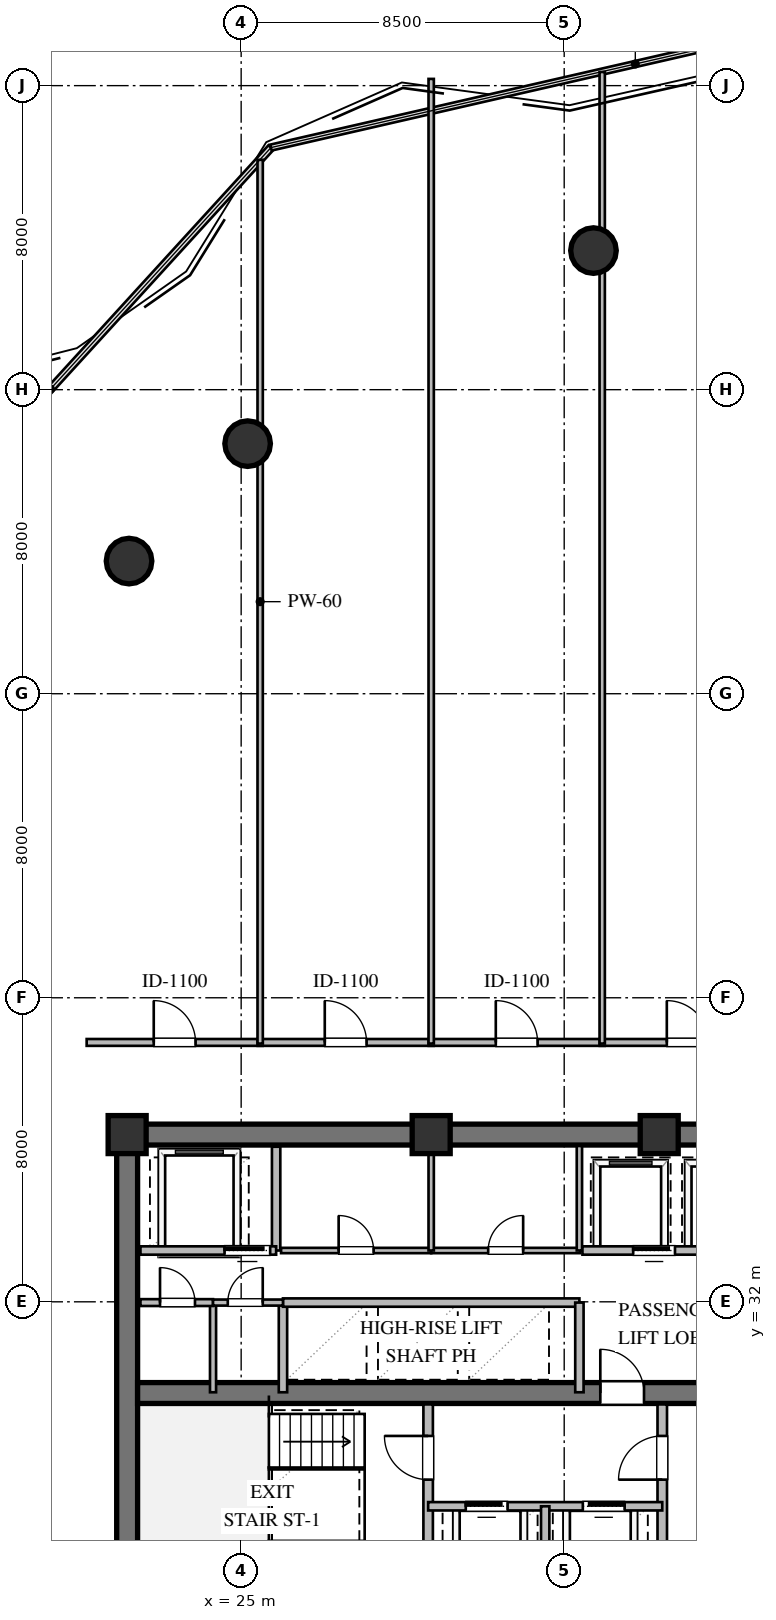
"""IFC4 building model, lengths in metres.
Left out: names, types, materials, properties, quantities, classifications, styles, units other than length and angle.
Written with IfcOpenShell. Run it as: python <this file> out.ifc"""

import sys

from ifc_helpers import new_model, si_unit, direction, frame, frame_2d, origin, origin_2d, place, context, subcontext, project, spatial, rectangle, circle, extrude, element, fill, save


model = new_model("IFC4")
c1 = context("Model", 3, precision=1e-05, world=origin(), true_north=direction((0.0, 1.0)))
c2 = subcontext(c1, "Body", "Model", "MODEL_VIEW")
j1 = project(units=[si_unit("LENGTHUNIT", "METRE"), si_unit("PLANEANGLEUNIT", "RADIAN")], contexts=[c1])
p1 = place(None, origin())
s1 = spatial("IfcSite", under=j1, at=p1, CompositionType="ELEMENT")
p2 = place(p1, origin())
s2 = spatial("IfcBuilding", under=s1, at=p2, CompositionType="ELEMENT")
p3 = place(p2, frame((0.0, 0.0, 171.0)))
s3 = spatial("IfcBuildingStorey", under=s2, at=p3, CompositionType="ELEMENT", Elevation=171.0)
p4 = place(p3, frame((21.725, 36.4, 0.0), z_axis=(0.0, 0.0, 1.0), x_axis=(1.0, 0.0, 0.0)))
e1 = element("IfcWall", 1, at=p4, inside=s3, PredefinedType="SHEAR", context=c2, shape_type="SweptSolid", body=[
    extrude(rectangle(XDim=22.55, YDim=0.55, at=frame_2d((11.275, 0.0))), origin(), (0.0, 0.0, 1.0), 3.36),
])
p5 = place(p3, frame((22.0, 23.875, 0.0), z_axis=(0.0, 0.0, 1.0), x_axis=(0.0, 1.0, 0.0)))
e2 = element("IfcWall", 2, at=p5, inside=s3, PredefinedType="SHEAR", context=c2, shape_type="SweptSolid", body=[
    extrude(rectangle(XDim=12.25, YDim=0.55, at=frame_2d((6.125, 0.0))), origin(), (0.0, 0.0, 1.0), 3.36),
])
p6 = place(p3, frame((22.275, 29.6, 0.0), z_axis=(0.0, 0.0, 1.0), x_axis=(1.0, 0.0, 0.0)))
e3 = element("IfcWall", 3, at=p6, inside=s3, PredefinedType="SHEAR", context=c2, shape_type="SweptSolid", body=[
    extrude(rectangle(XDim=21.45, YDim=0.55, at=frame_2d((10.725, 0.0))), origin(), (0.0, 0.0, 1.0), 3.36),
])
p7 = place(p6, frame((12.175, 0.0, 0.0)))
e4 = element("IfcOpeningElement", 4, at=p7, cuts=e3, PredefinedType="OPENING", context=c2, shape_type="SweptSolid", body=[
    extrude(rectangle(XDim=1.15, YDim=2.1, at=frame_2d((0.575, 1.05))), frame((0.0, 0.285, 0.0), z_axis=(0.0, -1.0, 0.0), x_axis=(1.0, 0.0, 0.0)), (0.0, 0.0, 1.0), 0.57),
])
for number, where, z_axis, x_axis in (
    (5, (36.0, 36.4, 0.0), (0.0, 0.0, 1.0), (1.0, 0.0, 0.0)),
    (6, (30.0, 36.4, 0.0), (0.0, 0.0, 1.0), (1.0, 0.0, 0.0)),
    (7, (22.0, 36.4, 0.0), (0.0, 0.0, 1.0), (1.0, 0.0, 0.0)),
):
    element("IfcColumn", number, at=place(p3, frame(where, z_axis=z_axis, x_axis=x_axis)), inside=s3, PredefinedType="COLUMN", context=c2, shape_type="SweptSolid", body=[
        extrude(rectangle(XDim=1.0, YDim=1.0, at=origin_2d()), origin(), (0.0, 0.0, 1.0), 3.6),
    ])
for number, where, z_axis, x_axis in (
    (8, (34.27, 59.66, 0.0), (0.0, 0.0, 1.0), (1.0, 0.0, 0.0)),
    (9, (25.17, 54.58, 0.0), (0.0, 0.0, 1.0), (1.0, 0.0, 0.0)),
    (10, (22.05, 51.49, 0.0), (0.0, 0.0, 1.0), (1.0, 0.0, 0.0)),
):
    element("IfcColumn", number, at=place(p3, frame(where, z_axis=z_axis, x_axis=x_axis)), inside=s3, PredefinedType="COLUMN", context=c2, shape_type="SweptSolid", body=[
        extrude(circle(Radius=0.6, at=origin_2d()), origin(), (0.0, 0.0, 1.0), 3.6),
    ])
p8 = place(p3, frame((29.92, 23.9, 0.0), z_axis=(0.0, 0.0, 1.0), x_axis=(0.0, 1.0, 0.0)))
e11 = element("IfcWall", 11, at=p8, inside=s3, PredefinedType="SOLIDWALL", context=c2, shape_type="SweptSolid", body=[
    extrude(rectangle(XDim=5.4, YDim=0.25, at=frame_2d((2.7, 0.0))), origin(), (0.0, 0.0, 1.0), 2.89),
])
p9 = place(p8, frame((3.421, 0.0, 0.0)))
e12 = element("IfcOpeningElement", 12, at=p9, cuts=e11, PredefinedType="OPENING", context=c2, shape_type="SweptSolid", body=[
    extrude(rectangle(XDim=1.15, YDim=2.1, at=frame_2d((0.575, 1.05))), frame((0.0, 0.135, 0.0), z_axis=(0.0, -1.0, 0.0), x_axis=(1.0, 0.0, 0.0)), (0.0, 0.0, 1.0), 0.27),
])
p10 = place(p3, frame((36.08, 23.9, 0.0), z_axis=(0.0, 0.0, 1.0), x_axis=(0.0, 1.0, 0.0)))
e13 = element("IfcWall", 13, at=p10, inside=s3, PredefinedType="SOLIDWALL", context=c2, shape_type="SweptSolid", body=[
    extrude(rectangle(XDim=5.4, YDim=0.25, at=frame_2d((2.7, 0.0))), origin(), (0.0, 0.0, 1.0), 3.36),
])
p11 = place(p10, frame((3.421, 0.0, 0.0)))
e14 = element("IfcOpeningElement", 14, at=p11, cuts=e13, PredefinedType="OPENING", context=c2, shape_type="SweptSolid", body=[
    extrude(rectangle(XDim=1.15, YDim=2.1, at=frame_2d((0.575, 1.05))), frame((0.0, 0.135, 0.0), z_axis=(0.0, -1.0, 0.0), x_axis=(1.0, 0.0, 0.0)), (0.0, 0.0, 1.0), 0.27),
])
p12 = place(p3, frame((29.92, 26.62, 0.0), z_axis=(0.0, 0.0, 1.0), x_axis=(1.0, 0.0, 0.0)))
e15 = element("IfcWall", 15, at=p12, inside=s3, PredefinedType="SOLIDWALL", context=c2, shape_type="SweptSolid", body=[
    extrude(rectangle(XDim=6.16, YDim=0.22, at=frame_2d((3.08, 0.0))), origin(), (0.0, 0.0, 1.0), 3.36),
])
p13 = place(p12, frame((0.99, 0.0, 0.0)))
e16 = element("IfcOpeningElement", 16, at=p13, cuts=e15, PredefinedType="OPENING", context=c2, shape_type="SweptSolid", body=[
    extrude(rectangle(XDim=1.1, YDim=2.1, at=frame_2d((0.55, 1.05))), frame((0.0, 0.12, 0.0), z_axis=(0.0, -1.0, 0.0), x_axis=(1.0, 0.0, 0.0)), (0.0, 0.0, 1.0), 0.24),
])
p14 = place(p12, frame((4.07, 0.0, 0.0)))
e17 = element("IfcOpeningElement", 17, at=p14, cuts=e15, PredefinedType="OPENING", context=c2, shape_type="SweptSolid", body=[
    extrude(rectangle(XDim=1.1, YDim=2.1, at=frame_2d((0.55, 1.05))), frame((0.0, 0.12, 0.0), z_axis=(0.0, -1.0, 0.0), x_axis=(1.0, 0.0, 0.0)), (0.0, 0.0, 1.0), 0.24),
])
p15 = place(p3, frame((33.0, 23.9, 0.0), z_axis=(0.0, 0.0, 1.0), x_axis=(0.0, 1.0, 0.0)))
e18 = element("IfcWall", 18, at=p15, inside=s3, PredefinedType="SOLIDWALL", context=c2, shape_type="SweptSolid", body=[
    extrude(rectangle(XDim=2.72, YDim=0.22, at=frame_2d((1.36, 0.0))), origin(), (0.0, 0.0, 1.0), 3.36),
])
p16 = place(p3, frame((25.92, 33.35, 0.0), z_axis=(0.0, 0.0, 1.0), x_axis=(0.0, 1.0, 0.0)))
e19 = element("IfcWall", 19, at=p16, inside=s3, PredefinedType="SOLIDWALL", context=c2, shape_type="SweptSolid", body=[
    extrude(rectangle(XDim=2.73, YDim=0.22, at=frame_2d((1.365, 0.0))), origin(), (0.0, 0.0, 1.0), 3.36),
])
p17 = place(p3, frame((22.35, 33.35, 0.0), z_axis=(0.0, 0.0, 1.0), x_axis=(1.0, 0.0, 0.0)))
e20 = element("IfcWall", 20, at=p17, inside=s3, PredefinedType="SOLIDWALL", context=c2, shape_type="SweptSolid", body=[
    extrude(rectangle(XDim=3.57, YDim=0.22, at=frame_2d((1.785, 0.0))), origin(), (0.0, 0.0, 1.0), 3.36),
])
p18 = place(p17, frame((2.213, 0.0, 0.0)))
e21 = element("IfcOpeningElement", 21, at=p18, cuts=e20, PredefinedType="OPENING", context=c2, shape_type="SweptSolid", body=[
    extrude(rectangle(XDim=1.2, YDim=2.1, at=frame_2d((0.6, 1.05))), frame((0.0, 0.12, 0.0), z_axis=(0.0, -1.0, 0.0), x_axis=(1.0, 0.0, 0.0)), (0.0, 0.0, 1.0), 0.24),
])
p19 = place(p3, frame((26.1, 29.62, 0.0), z_axis=(0.0, 0.0, 1.0), x_axis=(0.0, 1.0, 0.0)))
e22 = element("IfcWall", 22, at=p19, inside=s3, PredefinedType="SOLIDWALL", context=c2, shape_type="SweptSolid", body=[
    extrude(rectangle(XDim=2.36, YDim=0.22, at=frame_2d((1.18, 0.0))), origin(), (0.0, 0.0, 1.0), 3.36),
])
p20 = place(p3, frame((26.1, 31.98, 0.0), z_axis=(0.0, 0.0, 1.0), x_axis=(1.0, 0.0, 0.0)))
e23 = element("IfcWall", 23, at=p20, inside=s3, PredefinedType="SOLIDWALL", context=c2, shape_type="SweptSolid", body=[
    extrude(rectangle(XDim=7.8, YDim=0.22, at=frame_2d((3.9, 0.0))), origin(), (0.0, 0.0, 1.0), 3.36),
])
p21 = place(p3, frame((33.9, 29.62, 0.0), z_axis=(0.0, 0.0, 1.0), x_axis=(0.0, 1.0, 0.0)))
e24 = element("IfcWall", 24, at=p21, inside=s3, PredefinedType="SOLIDWALL", context=c2, shape_type="SweptSolid", body=[
    extrude(rectangle(XDim=2.36, YDim=0.22, at=frame_2d((1.18, 0.0))), origin(), (0.0, 0.0, 1.0), 3.36),
])
p22 = place(p3, frame((26.05, 33.35, 0.0), z_axis=(0.0, 0.0, 1.0), x_axis=(1.0, 0.0, 0.0)))
e25 = element("IfcWall", 25, at=p22, inside=s3, PredefinedType="PARTITIONING", context=c2, shape_type="SweptSolid", body=[
    extrude(rectangle(XDim=3.95, YDim=0.14, at=frame_2d((1.975, 0.0))), origin(), (0.0, 0.0, 1.0), 3.36),
])
p23 = place(p22, frame((1.515, 0.0, 0.0)))
e26 = element("IfcOpeningElement", 26, at=p23, cuts=e25, PredefinedType="OPENING", context=c2, shape_type="SweptSolid", body=[
    extrude(rectangle(XDim=0.92, YDim=2.1, at=frame_2d((0.46, 1.05))), frame((0.0, 0.08, 0.0), z_axis=(0.0, -1.0, 0.0), x_axis=(1.0, 0.0, 0.0)), (0.0, 0.0, 1.0), 0.16),
])
p24 = place(p3, frame((30.0, 33.35, 0.0), z_axis=(0.0, 0.0, 1.0), x_axis=(1.0, 0.0, 0.0)))
e27 = element("IfcWall", 27, at=p24, inside=s3, PredefinedType="PARTITIONING", context=c2, shape_type="SweptSolid", body=[
    extrude(rectangle(XDim=3.92, YDim=0.14, at=frame_2d((1.96, 0.0))), origin(), (0.0, 0.0, 1.0), 3.36),
])
p25 = place(p24, frame((1.5, 0.0, 0.0)))
e28 = element("IfcOpeningElement", 28, at=p25, cuts=e27, PredefinedType="OPENING", context=c2, shape_type="SweptSolid", body=[
    extrude(rectangle(XDim=0.92, YDim=2.1, at=frame_2d((0.46, 1.05))), frame((0.0, 0.08, 0.0), z_axis=(0.0, -1.0, 0.0), x_axis=(1.0, 0.0, 0.0)), (0.0, 0.0, 1.0), 0.16),
])
for number, where, z_axis, x_axis in (
    (29, (30.0, 33.35, 0.0), (0.0, 0.0, 1.0), (0.0, 1.0, 0.0)),
    (30, (33.9, 33.35, 0.0), (0.0, 0.0, 1.0), (0.0, 1.0, 0.0)),
):
    element("IfcWall", number, at=place(p3, frame(where, z_axis=z_axis, x_axis=x_axis)), inside=s3, PredefinedType="PARTITIONING", context=c2, shape_type="SweptSolid", body=[
        extrude(rectangle(XDim=2.75, YDim=0.14, at=frame_2d((1.375, 0.0))), origin(), (0.0, 0.0, 1.0), 3.36),
    ])
p26 = place(p3, frame((33.98, 33.35, 0.0), z_axis=(0.0, 0.0, 1.0), x_axis=(1.0, 0.0, 0.0)))
e31 = element("IfcWall", 31, at=p26, inside=s3, PredefinedType="SOLIDWALL", context=c2, shape_type="SweptSolid", body=[
    extrude(rectangle(XDim=7.54, YDim=0.22, at=frame_2d((3.77, 0.0))), origin(), (0.0, 0.0, 1.0), 3.36),
])
p27 = place(p26, frame((1.335, 0.0, 0.0)))
e32 = element("IfcOpeningElement", 32, at=p27, cuts=e31, PredefinedType="OPENING", context=c2, shape_type="SweptSolid", body=[
    extrude(rectangle(XDim=1.1, YDim=2.1, at=frame_2d((0.55, 1.05))), frame((0.0, 0.12, 0.0), z_axis=(0.0, -1.0, 0.0), x_axis=(1.0, 0.0, 0.0)), (0.0, 0.0, 1.0), 0.24),
])
p28 = place(p26, frame((4.879, 0.0, 0.0)))
e33 = element("IfcOpeningElement", 33, at=p28, cuts=e31, PredefinedType="OPENING", context=c2, shape_type="SweptSolid", body=[
    extrude(rectangle(XDim=1.1, YDim=2.1, at=frame_2d((0.55, 1.05))), frame((0.0, 0.12, 0.0), z_axis=(0.0, -1.0, 0.0), x_axis=(1.0, 0.0, 0.0)), (0.0, 0.0, 1.0), 0.24),
])
p29 = place(p3, frame((24.26, 29.62, 0.0), z_axis=(0.0, 0.0, 1.0), x_axis=(0.0, 1.0, 0.0)))
e34 = element("IfcWall", 34, at=p29, inside=s3, PredefinedType="PLUMBINGWALL", context=c2, shape_type="SweptSolid", body=[
    extrude(rectangle(XDim=2.36, YDim=0.16, at=frame_2d((1.18, 0.0))), origin(), (0.0, 0.0, 1.0), 3.36),
])
p30 = place(p3, frame((22.35, 31.98, 0.0), z_axis=(0.0, 0.0, 1.0), x_axis=(1.0, 0.0, 0.0)))
e35 = element("IfcWall", 35, at=p30, inside=s3, PredefinedType="PARTITIONING", context=c2, shape_type="SweptSolid", body=[
    extrude(rectangle(XDim=1.91, YDim=0.18, at=frame_2d((0.955, 0.0))), origin(), (0.0, 0.0, 1.0), 3.36),
])
p31 = place(p30, frame((0.515, 0.0, 0.0)))
e36 = element("IfcOpeningElement", 36, at=p31, cuts=e35, PredefinedType="OPENING", context=c2, shape_type="SweptSolid", body=[
    extrude(rectangle(XDim=0.92, YDim=2.1, at=frame_2d((0.46, 1.05))), frame((0.0, 0.1, 0.0), z_axis=(0.0, -1.0, 0.0), x_axis=(1.0, 0.0, 0.0)), (0.0, 0.0, 1.0), 0.2),
])
p32 = place(p3, frame((24.26, 31.98, 0.0), z_axis=(0.0, 0.0, 1.0), x_axis=(1.0, 0.0, 0.0)))
e37 = element("IfcWall", 37, at=p32, inside=s3, PredefinedType="PLUMBINGWALL", context=c2, shape_type="SweptSolid", body=[
    extrude(rectangle(XDim=1.84, YDim=0.16, at=frame_2d((0.92, 0.0))), origin(), (0.0, 0.0, 1.0), 3.36),
])
p33 = place(p32, frame((0.388, 0.0, 0.0)))
e38 = element("IfcOpeningElement", 38, at=p33, cuts=e37, PredefinedType="OPENING", context=c2, shape_type="SweptSolid", body=[
    extrude(rectangle(XDim=0.92, YDim=2.1, at=frame_2d((0.46, 1.05))), frame((0.0, 0.09, 0.0), z_axis=(0.0, -1.0, 0.0), x_axis=(1.0, 0.0, 0.0)), (0.0, 0.0, 1.0), 0.18),
])
p34 = place(p3, frame((20.935, 38.825, 0.0), z_axis=(0.0, 0.0, 1.0), x_axis=(1.0, 0.0, 0.0)))
e39 = element("IfcWall", 39, at=p34, inside=s3, PredefinedType="PARTITIONING", context=c2, shape_type="SweptSolid", body=[
    extrude(rectangle(XDim=4.63, YDim=0.18, at=frame_2d((2.315, 0.0))), origin(), (0.0, 0.0, 1.0), 3.36),
])
p35 = place(p34, frame((1.765, 0.0, 0.0)))
e40 = element("IfcOpeningElement", 40, at=p35, cuts=e39, PredefinedType="OPENING", context=c2, shape_type="SweptSolid", body=[
    extrude(rectangle(XDim=1.1, YDim=2.1, at=frame_2d((0.55, 1.05))), frame((0.0, 0.1, 0.0), z_axis=(0.0, -1.0, 0.0), x_axis=(1.0, 0.0, 0.0)), (0.0, 0.0, 1.0), 0.2),
])
p36 = place(p3, frame((25.435, 38.825, 0.0), z_axis=(0.0, 0.0, 1.0), x_axis=(1.0, 0.0, 0.0)))
e41 = element("IfcWall", 41, at=p36, inside=s3, PredefinedType="PARTITIONING", context=c2, shape_type="SweptSolid", body=[
    extrude(rectangle(XDim=4.63, YDim=0.18, at=frame_2d((2.315, 0.0))), origin(), (0.0, 0.0, 1.0), 3.36),
])
p37 = place(p36, frame((1.765, 0.0, 0.0)))
e42 = element("IfcOpeningElement", 42, at=p37, cuts=e41, PredefinedType="OPENING", context=c2, shape_type="SweptSolid", body=[
    extrude(rectangle(XDim=1.1, YDim=2.1, at=frame_2d((0.55, 1.05))), frame((0.0, 0.1, 0.0), z_axis=(0.0, -1.0, 0.0), x_axis=(1.0, 0.0, 0.0)), (0.0, 0.0, 1.0), 0.2),
])
p38 = place(p3, frame((29.935, 38.825, 0.0), z_axis=(0.0, 0.0, 1.0), x_axis=(1.0, 0.0, 0.0)))
e43 = element("IfcWall", 43, at=p38, inside=s3, PredefinedType="PARTITIONING", context=c2, shape_type="SweptSolid", body=[
    extrude(rectangle(XDim=4.63, YDim=0.18, at=frame_2d((2.315, 0.0))), origin(), (0.0, 0.0, 1.0), 3.36),
])
p39 = place(p38, frame((1.765, 0.0, 0.0)))
e44 = element("IfcOpeningElement", 44, at=p39, cuts=e43, PredefinedType="OPENING", context=c2, shape_type="SweptSolid", body=[
    extrude(rectangle(XDim=1.1, YDim=2.1, at=frame_2d((0.55, 1.05))), frame((0.0, 0.1, 0.0), z_axis=(0.0, -1.0, 0.0), x_axis=(1.0, 0.0, 0.0)), (0.0, 0.0, 1.0), 0.2),
])
p40 = place(p3, frame((34.435, 38.825, 0.0), z_axis=(0.0, 0.0, 1.0), x_axis=(1.0, 0.0, 0.0)))
e45 = element("IfcWall", 45, at=p40, inside=s3, PredefinedType="PARTITIONING", context=c2, shape_type="SweptSolid", body=[
    extrude(rectangle(XDim=4.63, YDim=0.18, at=frame_2d((2.315, 0.0))), origin(), (0.0, 0.0, 1.0), 3.36),
])
p41 = place(p40, frame((1.765, 0.0, 0.0)))
e46 = element("IfcOpeningElement", 46, at=p41, cuts=e45, PredefinedType="OPENING", context=c2, shape_type="SweptSolid", body=[
    extrude(rectangle(XDim=1.1, YDim=2.1, at=frame_2d((0.55, 1.05))), frame((0.0, 0.1, 0.0), z_axis=(0.0, -1.0, 0.0), x_axis=(1.0, 0.0, 0.0)), (0.0, 0.0, 1.0), 0.2),
])
p42 = place(p3, frame((25.5, 62.049, 0.0), z_axis=(0.0, 0.0, 1.0), x_axis=(0.0, -1.0, 0.0)))
e47 = element("IfcWall", 47, at=p42, inside=s3, PredefinedType="PARTITIONING", context=c2, shape_type="SweptSolid", body=[
    extrude(rectangle(XDim=23.254, YDim=0.14, at=frame_2d((11.627, 0.0))), origin(), (0.0, 0.0, 1.0), 2.89),
])
p43 = place(p3, frame((30.0, 64.177, 0.0), z_axis=(0.0, 0.0, 1.0), x_axis=(0.0, -1.0, 0.0)))
e48 = element("IfcWall", 48, at=p43, inside=s3, PredefinedType="PARTITIONING", context=c2, shape_type="SweptSolid", body=[
    extrude(rectangle(XDim=25.382, YDim=0.14, at=frame_2d((12.691, 0.0))), origin(), (0.0, 0.0, 1.0), 3.36),
])
p44 = place(p3, frame((34.5, 64.359, 0.0), z_axis=(0.0, 0.0, 1.0), x_axis=(0.0, -1.0, 0.0)))
e49 = element("IfcWall", 49, at=p44, inside=s3, PredefinedType="PARTITIONING", context=c2, shape_type="SweptSolid", body=[
    extrude(rectangle(XDim=25.564, YDim=0.14, at=frame_2d((12.782, 0.0))), origin(), (0.0, 0.0, 1.0), 2.89),
])
p45 = place(p9, origin())
e50 = element("IfcDoor", 50, at=p45, inside=s3, OperationType="SINGLE_SWING_RIGHT", PredefinedType="DOOR", context=c2, shape_type="SweptSolid", body=[
    extrude(rectangle(XDim=1.15, YDim=2.1, at=frame_2d((0.575, 1.05))), frame((0.0, 0.025, 0.0), z_axis=(0.0, -1.0, 0.0), x_axis=(1.0, 0.0, 0.0)), (0.0, 0.0, 1.0), 0.05),
])
fill(e12, e50)
p46 = place(p11, origin())
e51 = element("IfcDoor", 51, at=p46, inside=s3, OperationType="SINGLE_SWING_LEFT", PredefinedType="DOOR", context=c2, shape_type="SweptSolid", body=[
    extrude(rectangle(XDim=1.15, YDim=2.1, at=frame_2d((0.575, 1.05))), frame((0.0, 0.025, 0.0), z_axis=(0.0, -1.0, 0.0), x_axis=(1.0, 0.0, 0.0)), (0.0, 0.0, 1.0), 0.05),
])
fill(e14, e51)
p47 = place(p13, origin())
e52 = element("IfcDoor", 52, at=p47, inside=s3, OperationType="SLIDING_TO_LEFT", PredefinedType="DOOR", context=c2, shape_type="SweptSolid", body=[
    extrude(rectangle(XDim=1.1, YDim=2.1, at=frame_2d((0.55, 1.05))), frame((0.0, 0.025, 0.0), z_axis=(0.0, -1.0, 0.0), x_axis=(1.0, 0.0, 0.0)), (0.0, 0.0, 1.0), 0.05),
])
fill(e16, e52)
p48 = place(p14, origin())
e53 = element("IfcDoor", 53, at=p48, inside=s3, OperationType="SLIDING_TO_RIGHT", PredefinedType="DOOR", context=c2, shape_type="SweptSolid", body=[
    extrude(rectangle(XDim=1.1, YDim=2.1, at=frame_2d((0.55, 1.05))), frame((0.0, 0.025, 0.0), z_axis=(0.0, -1.0, 0.0), x_axis=(1.0, 0.0, 0.0)), (0.0, 0.0, 1.0), 0.05),
])
fill(e17, e53)
p49 = place(p7, origin())
e54 = element("IfcDoor", 54, at=p49, inside=s3, OperationType="SINGLE_SWING_LEFT", PredefinedType="DOOR", context=c2, shape_type="SweptSolid", body=[
    extrude(rectangle(XDim=1.15, YDim=2.1, at=frame_2d((0.575, 1.05))), frame((0.0, 0.025, 0.0), z_axis=(0.0, -1.0, 0.0), x_axis=(1.0, 0.0, 0.0)), (0.0, 0.0, 1.0), 0.05),
])
fill(e4, e54)
p50 = place(p18, origin())
e55 = element("IfcDoor", 55, at=p50, inside=s3, OperationType="SLIDING_TO_LEFT", PredefinedType="DOOR", context=c2, shape_type="SweptSolid", body=[
    extrude(rectangle(XDim=1.2, YDim=2.1, at=frame_2d((0.6, 1.05))), frame((0.0, 0.025, 0.0), z_axis=(0.0, -1.0, 0.0), x_axis=(1.0, 0.0, 0.0)), (0.0, 0.0, 1.0), 0.05),
])
fill(e21, e55)
p51 = place(p23, origin())
e56 = element("IfcDoor", 56, at=p51, inside=s3, OperationType="SINGLE_SWING_LEFT", PredefinedType="DOOR", context=c2, shape_type="SweptSolid", body=[
    extrude(rectangle(XDim=0.92, YDim=2.1, at=frame_2d((0.46, 1.05))), frame((0.0, 0.025, 0.0), z_axis=(0.0, -1.0, 0.0), x_axis=(1.0, 0.0, 0.0)), (0.0, 0.0, 1.0), 0.05),
])
fill(e26, e56)
p52 = place(p25, origin())
e57 = element("IfcDoor", 57, at=p52, inside=s3, OperationType="SINGLE_SWING_RIGHT", PredefinedType="DOOR", context=c2, shape_type="SweptSolid", body=[
    extrude(rectangle(XDim=0.92, YDim=2.1, at=frame_2d((0.46, 1.05))), frame((0.0, 0.025, 0.0), z_axis=(0.0, -1.0, 0.0), x_axis=(1.0, 0.0, 0.0)), (0.0, 0.0, 1.0), 0.05),
])
fill(e28, e57)
p53 = place(p27, origin())
e58 = element("IfcDoor", 58, at=p53, inside=s3, OperationType="SLIDING_TO_LEFT", PredefinedType="DOOR", context=c2, shape_type="SweptSolid", body=[
    extrude(rectangle(XDim=1.1, YDim=2.1, at=frame_2d((0.55, 1.05))), frame((0.0, 0.025, 0.0), z_axis=(0.0, -1.0, 0.0), x_axis=(1.0, 0.0, 0.0)), (0.0, 0.0, 1.0), 0.05),
])
fill(e32, e58)
p54 = place(p31, origin())
e59 = element("IfcDoor", 59, at=p54, inside=s3, OperationType="SINGLE_SWING_LEFT", PredefinedType="DOOR", context=c2, shape_type="SweptSolid", body=[
    extrude(rectangle(XDim=0.92, YDim=2.1, at=frame_2d((0.46, 1.05))), frame((0.0, 0.025, 0.0), z_axis=(0.0, -1.0, 0.0), x_axis=(1.0, 0.0, 0.0)), (0.0, 0.0, 1.0), 0.05),
])
fill(e36, e59)
p55 = place(p33, origin())
e60 = element("IfcDoor", 60, at=p55, inside=s3, OperationType="SINGLE_SWING_RIGHT", PredefinedType="DOOR", context=c2, shape_type="SweptSolid", body=[
    extrude(rectangle(XDim=0.92, YDim=2.1, at=frame_2d((0.46, 1.05))), frame((0.0, 0.025, 0.0), z_axis=(0.0, -1.0, 0.0), x_axis=(1.0, 0.0, 0.0)), (0.0, 0.0, 1.0), 0.05),
])
fill(e38, e60)
p56 = place(p35, origin())
e61 = element("IfcDoor", 61, at=p56, inside=s3, OperationType="SINGLE_SWING_LEFT", PredefinedType="DOOR", context=c2, shape_type="SweptSolid", body=[
    extrude(rectangle(XDim=1.1, YDim=2.1, at=frame_2d((0.55, 1.05))), frame((0.0, 0.025, 0.0), z_axis=(0.0, -1.0, 0.0), x_axis=(1.0, 0.0, 0.0)), (0.0, 0.0, 1.0), 0.05),
])
fill(e40, e61)
p57 = place(p37, origin())
e62 = element("IfcDoor", 62, at=p57, inside=s3, OperationType="SINGLE_SWING_LEFT", PredefinedType="DOOR", context=c2, shape_type="SweptSolid", body=[
    extrude(rectangle(XDim=1.1, YDim=2.1, at=frame_2d((0.55, 1.05))), frame((0.0, 0.025, 0.0), z_axis=(0.0, -1.0, 0.0), x_axis=(1.0, 0.0, 0.0)), (0.0, 0.0, 1.0), 0.05),
])
fill(e42, e62)
p58 = place(p39, origin())
e63 = element("IfcDoor", 63, at=p58, inside=s3, OperationType="SINGLE_SWING_LEFT", PredefinedType="DOOR", context=c2, shape_type="SweptSolid", body=[
    extrude(rectangle(XDim=1.1, YDim=2.1, at=frame_2d((0.55, 1.05))), frame((0.0, 0.025, 0.0), z_axis=(0.0, -1.0, 0.0), x_axis=(1.0, 0.0, 0.0)), (0.0, 0.0, 1.0), 0.05),
])
fill(e44, e63)
p59 = place(p41, origin())
e64 = element("IfcDoor", 64, at=p59, inside=s3, OperationType="SINGLE_SWING_LEFT", PredefinedType="DOOR", context=c2, shape_type="SweptSolid", body=[
    extrude(rectangle(XDim=1.1, YDim=2.1, at=frame_2d((0.55, 1.05))), frame((0.0, 0.025, 0.0), z_axis=(0.0, -1.0, 0.0), x_axis=(1.0, 0.0, 0.0)), (0.0, 0.0, 1.0), 0.05),
])
fill(e46, e64)
save(model, sys.argv[1])
